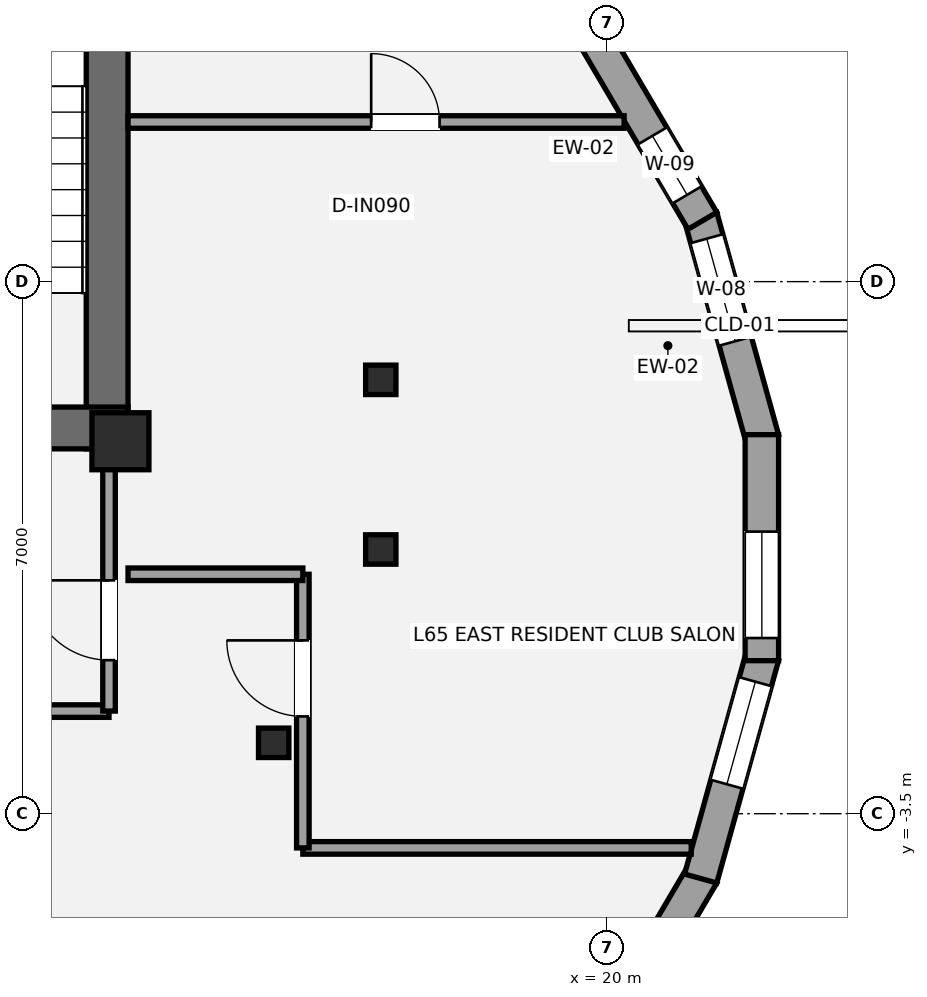
"""IFC4 building model, lengths in metres.
Left out: names, types, materials, properties, quantities, classifications, styles, units other than length and angle.
Written with IfcOpenShell. Run it as: python <this file> out.ifc"""

import sys

from ifc_helpers import new_model, si_unit, direction, frame, frame_2d, origin, origin_2d, place, context, subcontext, project, spatial, rectangle, i_section, extrude, element, fill, save


model = new_model("IFC4")
c1 = context("Model", 3, precision=1e-05, world=origin(), true_north=direction((0.0, 1.0)))
c2 = subcontext(c1, "Body", "Model", "MODEL_VIEW")
j1 = project(units=[si_unit("LENGTHUNIT", "METRE"), si_unit("PLANEANGLEUNIT", "RADIAN")], contexts=[c1])
p1 = place(None, origin())
s1 = spatial("IfcSite", under=j1, at=p1, CompositionType="ELEMENT")
p2 = place(p1, origin())
s2 = spatial("IfcBuilding", under=s1, at=p2, CompositionType="ELEMENT")
p3 = place(p2, frame((0.0, 0.0, 232.05)))
s3 = spatial("IfcBuildingStorey", under=s2, at=p3, CompositionType="ELEMENT", Elevation=232.05)
p4 = place(p3, frame((13.425, 1.3, 0.0), z_axis=(0.0, 0.0, 1.0), x_axis=(0.0, 1.0, 0.0)))
e1 = element("IfcWall", 1, at=p4, inside=s3, PredefinedType="SHEAR", context=c2, shape_type="SweptSolid", body=[
    extrude(rectangle(XDim=8.25, YDim=0.55, at=frame_2d((4.125, 0.0))), origin(), (0.0, 0.0, 1.0), 3.15),
])
p5 = place(p3, frame((13.7, 1.575, 0.0), z_axis=(0.0, 0.0, 1.0), x_axis=(-1.0, 0.0, 0.0)))
e2 = element("IfcWall", 2, at=p5, inside=s3, PredefinedType="SHEAR", context=c2, shape_type="SweptSolid", body=[
    extrude(rectangle(XDim=8.775, YDim=0.55, at=frame_2d((4.387, 0.0))), origin(), (0.0, 0.0, 1.0), 3.15),
])
p6 = place(p5, frame((2.35, 0.0, 0.0)))
e3 = element("IfcOpeningElement", 3, at=p6, cuts=e2, PredefinedType="OPENING", context=c2, shape_type="SweptSolid", body=[
    extrude(rectangle(XDim=1.05, YDim=2.15, at=frame_2d((0.525, 1.075))), frame((0.0, 0.285, 0.0), z_axis=(0.0, -1.0, 0.0), x_axis=(1.0, 0.0, 0.0)), (0.0, 0.0, 1.0), 0.57),
])
p7 = place(p5, frame((4.35, 0.0, 0.0)))
e4 = element("IfcOpeningElement", 4, at=p7, cuts=e2, PredefinedType="OPENING", context=c2, shape_type="SweptSolid", body=[
    extrude(rectangle(XDim=1.1, YDim=2.2, at=frame_2d((0.55, 1.1))), frame((0.0, 0.285, 0.0), z_axis=(0.0, -1.0, 0.0), x_axis=(1.0, 0.0, 0.0)), (0.0, 0.0, 1.0), 0.57),
])
p8 = place(p3, frame((13.6, 1.4, 0.0), z_axis=(0.0, 0.0, 1.0), x_axis=(1.0, 0.0, 0.0)))
e5 = element("IfcColumn", 5, at=p8, inside=s3, PredefinedType="PILASTER", context=c2, shape_type="SweptSolid", body=[
    extrude(rectangle(XDim=0.75, YDim=0.75, at=origin_2d()), origin(), (0.0, 0.0, 1.0), 3.15),
])
for number, where, z_axis, x_axis in (
    (6, (17.026, 2.208, 0.0), (0.0, 0.0, 1.0), (1.0, 0.0, 0.0)),
    (7, (15.616, -2.567, 0.0), (0.0, 0.0, 1.0), (1.0, 0.0, 0.0)),
    (8, (17.026, -0.024, 0.0), (0.0, 0.0, 1.0), (1.0, 0.0, 0.0)),
):
    element("IfcColumn", number, at=place(p3, frame(where, z_axis=z_axis, x_axis=x_axis)), inside=s3, PredefinedType="COLUMN", context=c2, shape_type="SweptSolid", body=[
        extrude(i_section(OverallWidth=0.399, OverallDepth=0.387, WebThickness=0.021, FlangeThickness=0.033, at=origin_2d()), origin(), (0.0, 0.0, 1.0), 3.15),
    ])
p9 = place(p3, frame((21.235, 4.353, 0.0), z_axis=(0.0, 0.0, 1.0), x_axis=(0.267714373586, -0.963498320795, 0.0)))
e9 = element("IfcWall", 9, at=p9, inside=s3, PredefinedType="STANDARD", context=c2, shape_type="SweptSolid", body=[
    extrude(rectangle(XDim=3.036, YDim=0.44, at=frame_2d((1.518, 0.0))), origin(), (0.0, 0.0, 1.0), 2.336),
])
p10 = place(p9, frame((0.299, 0.0, 0.55)))
e10 = element("IfcOpeningElement", 10, at=p10, cuts=e9, PredefinedType="OPENING", context=c2, shape_type="SweptSolid", body=[
    extrude(rectangle(XDim=1.4, YDim=1.55, at=frame_2d((0.7, 0.775))), frame((0.0, 0.23, 0.0), z_axis=(0.0, -1.0, 0.0), x_axis=(1.0, 0.0, 0.0)), (0.0, 0.0, 1.0), 0.46),
])
p11 = place(p3, frame((19.626, 7.071, 0.0), z_axis=(0.0, 0.0, 1.0), x_axis=(0.507308799926, -0.861764342218, 0.0)))
e11 = element("IfcWall", 11, at=p11, inside=s3, PredefinedType="STANDARD", context=c2, shape_type="SweptSolid", body=[
    extrude(rectangle(XDim=3.215, YDim=0.44, at=frame_2d((1.607, 0.0))), origin(), (0.0, 0.0, 1.0), 2.336),
])
p12 = place(p11, frame((1.919, 0.0, 0.58)))
e12 = element("IfcOpeningElement", 12, at=p12, cuts=e11, PredefinedType="OPENING", context=c2, shape_type="SweptSolid", body=[
    extrude(rectangle(XDim=0.9, YDim=1.35, at=frame_2d((0.45, 0.675))), frame((0.0, 0.23, 0.0), z_axis=(0.0, -1.0, 0.0), x_axis=(1.0, 0.0, 0.0)), (0.0, 0.0, 1.0), 0.46),
])
p13 = place(p3, frame((21.257, -4.3, 0.0), z_axis=(0.0, 0.0, 1.0), x_axis=(-0.507308799926, -0.861764342218, 0.0)))
e13 = element("IfcWall", 13, at=p13, inside=s3, PredefinedType="STANDARD", context=c2, shape_type="SweptSolid", body=[
    extrude(rectangle(XDim=3.215, YDim=0.44, at=frame_2d((1.607, 0.0))), origin(), (0.0, 0.0, 1.0), 2.336),
])
p14 = place(p13, frame((1.33, 0.0, 0.58)))
e14 = element("IfcOpeningElement", 14, at=p14, cuts=e13, PredefinedType="OPENING", context=c2, shape_type="SweptSolid", body=[
    extrude(rectangle(XDim=0.9, YDim=1.35, at=frame_2d((0.45, 0.675))), frame((0.0, 0.23, 0.0), z_axis=(0.0, -1.0, 0.0), x_axis=(1.0, 0.0, 0.0)), (0.0, 0.0, 1.0), 0.46),
])
p15 = place(p3, frame((22.047, -1.428, 0.0), z_axis=(0.0, 0.0, 1.0), x_axis=(-0.267714373586, -0.963498320795, 0.0)))
e15 = element("IfcWall", 15, at=p15, inside=s3, PredefinedType="STANDARD", context=c2, shape_type="SweptSolid", body=[
    extrude(rectangle(XDim=3.036, YDim=0.44, at=frame_2d((1.518, 0.0))), origin(), (0.0, 0.0, 1.0), 2.336),
])
p16 = place(p15, frame((0.348, 0.0, 0.55)))
e16 = element("IfcOpeningElement", 16, at=p16, cuts=e15, PredefinedType="OPENING", context=c2, shape_type="SweptSolid", body=[
    extrude(rectangle(XDim=1.4, YDim=1.55, at=frame_2d((0.7, 0.775))), frame((0.0, 0.23, 0.0), z_axis=(0.0, -1.0, 0.0), x_axis=(1.0, 0.0, 0.0)), (0.0, 0.0, 1.0), 0.46),
])
p17 = place(p3, frame((22.039, 1.487, 0.0), z_axis=(0.0, 0.0, 1.0), x_axis=(0.0, -1.0, 0.0)))
e17 = element("IfcWall", 17, at=p17, inside=s3, PredefinedType="STANDARD", context=c2, shape_type="SweptSolid", body=[
    extrude(rectangle(XDim=2.974, YDim=0.44, at=frame_2d((1.487, 0.0))), origin(), (0.0, 0.0, 1.0), 2.336),
])
p18 = place(p17, frame((1.276, 0.0, 0.58)))
e18 = element("IfcOpeningElement", 18, at=p18, cuts=e17, PredefinedType="OPENING", context=c2, shape_type="SweptSolid", body=[
    extrude(rectangle(XDim=1.4, YDim=1.55, at=frame_2d((0.7, 0.775))), frame((0.0, 0.23, 0.0), z_axis=(0.0, -1.0, 0.0), x_axis=(1.0, 0.0, 0.0)), (0.0, 0.0, 1.0), 0.46),
])
p19 = place(p3, frame((7.2, -2.15, 0.0), z_axis=(0.0, 0.0, 1.0), x_axis=(1.0, 0.0, 0.0)))
e19 = element("IfcWall", 19, at=p19, inside=s3, PredefinedType="PARTITIONING", context=c2, shape_type="SweptSolid", body=[
    extrude(rectangle(XDim=6.25, YDim=0.165, at=frame_2d((3.125, 0.0))), origin(), (0.0, 0.0, 1.0), 2.97),
])
p20 = place(p3, frame((13.45, -2.15, 0.0), z_axis=(0.0, 0.0, 1.0), x_axis=(0.0, 1.0, 0.0)))
e20 = element("IfcWall", 20, at=p20, inside=s3, PredefinedType="PARTITIONING", context=c2, shape_type="SweptSolid", body=[
    extrude(rectangle(XDim=3.5, YDim=0.165, at=frame_2d((1.75, 0.0))), origin(), (0.0, 0.0, 1.0), 2.423),
])
p21 = place(p20, frame((0.67, 0.0, 0.0)))
e21 = element("IfcOpeningElement", 21, at=p21, cuts=e20, PredefinedType="OPENING", context=c2, shape_type="SweptSolid", body=[
    extrude(rectangle(XDim=1.05, YDim=2.15, at=frame_2d((0.525, 1.075))), frame((0.0, 0.093, 0.0), z_axis=(0.0, -1.0, 0.0), x_axis=(1.0, 0.0, 0.0)), (0.0, 0.0, 1.0), 0.185),
])
p22 = place(p3, frame((16.0, -3.95, 0.0), z_axis=(0.0, 0.0, 1.0), x_axis=(1.0, 0.0, 0.0)))
e22 = element("IfcWall", 22, at=p22, inside=s3, PredefinedType="PARTITIONING", context=c2, shape_type="SweptSolid", body=[
    extrude(rectangle(XDim=5.11, YDim=0.165, at=frame_2d((2.555, 0.0))), origin(), (0.0, 0.0, 1.0), 2.423),
])
p23 = place(p3, frame((16.0, -3.95, 0.0), z_axis=(0.0, 0.0, 1.0), x_axis=(0.0, 1.0, 0.0)))
e23 = element("IfcWall", 23, at=p23, inside=s3, PredefinedType="PARTITIONING", context=c2, shape_type="SweptSolid", body=[
    extrude(rectangle(XDim=3.6, YDim=0.165, at=frame_2d((1.8, 0.0))), origin(), (0.0, 0.0, 1.0), 2.357),
])
p24 = place(p23, frame((1.73, 0.0, 0.0)))
e24 = element("IfcOpeningElement", 24, at=p24, cuts=e23, PredefinedType="OPENING", context=c2, shape_type="SweptSolid", body=[
    extrude(rectangle(XDim=1.0, YDim=2.15, at=frame_2d((0.5, 1.075))), frame((0.0, 0.093, 0.0), z_axis=(0.0, -1.0, 0.0), x_axis=(1.0, 0.0, 0.0)), (0.0, 0.0, 1.0), 0.185),
])
p25 = place(p3, frame((13.7, -0.35, 0.0), z_axis=(0.0, 0.0, 1.0), x_axis=(1.0, 0.0, 0.0)))
e25 = element("IfcWall", 25, at=p25, inside=s3, PredefinedType="PARTITIONING", context=c2, shape_type="SweptSolid", body=[
    extrude(rectangle(XDim=2.3, YDim=0.165, at=frame_2d((1.15, 0.0))), origin(), (0.0, 0.0, 1.0), 2.423),
])
p26 = place(p3, frame((13.7, 5.6, 0.0), z_axis=(0.0, 0.0, 1.0), x_axis=(1.0, 0.0, 0.0)))
e26 = element("IfcWall", 26, at=p26, inside=s3, PredefinedType="PARTITIONING", context=c2, shape_type="SweptSolid", body=[
    extrude(rectangle(XDim=6.527, YDim=0.165, at=frame_2d((3.264, 0.0))), origin(), (0.0, 0.0, 1.0), 2.423),
])
p27 = place(p26, frame((3.199, 0.0, 0.0)))
e27 = element("IfcOpeningElement", 27, at=p27, cuts=e26, PredefinedType="OPENING", context=c2, shape_type="SweptSolid", body=[
    extrude(rectangle(XDim=0.9, YDim=2.1, at=frame_2d((0.45, 1.05))), frame((0.0, 0.093, 0.0), z_axis=(0.0, -1.0, 0.0), x_axis=(1.0, 0.0, 0.0)), (0.0, 0.0, 1.0), 0.185),
])
p28 = place(p10, origin())
e28 = element("IfcWindow", 28, at=p28, inside=s3, PartitioningType="SINGLE_PANEL", PredefinedType="WINDOW", context=c2, shape_type="SweptSolid", body=[
    extrude(rectangle(XDim=1.4, YDim=1.55, at=frame_2d((0.7, 0.775))), frame((0.0, -0.01, 0.0), z_axis=(0.0, -1.0, 0.0), x_axis=(1.0, 0.0, 0.0)), (0.0, 0.0, 1.0), 0.06),
])
fill(e10, e28)
p29 = place(p12, origin())
e29 = element("IfcWindow", 29, at=p29, inside=s3, PartitioningType="SINGLE_PANEL", PredefinedType="WINDOW", context=c2, shape_type="SweptSolid", body=[
    extrude(rectangle(XDim=0.9, YDim=1.35, at=frame_2d((0.45, 0.675))), frame((0.0, -0.01, 0.0), z_axis=(0.0, -1.0, 0.0), x_axis=(1.0, 0.0, 0.0)), (0.0, 0.0, 1.0), 0.06),
])
fill(e12, e29)
p30 = place(p16, origin())
e30 = element("IfcWindow", 30, at=p30, inside=s3, PartitioningType="SINGLE_PANEL", PredefinedType="WINDOW", context=c2, shape_type="SweptSolid", body=[
    extrude(rectangle(XDim=1.4, YDim=1.55, at=frame_2d((0.7, 0.775))), frame((0.0, -0.01, 0.0), z_axis=(0.0, -1.0, 0.0), x_axis=(1.0, 0.0, 0.0)), (0.0, 0.0, 1.0), 0.06),
])
fill(e16, e30)
p31 = place(p18, origin())
e31 = element("IfcWindow", 31, at=p31, inside=s3, PartitioningType="SINGLE_PANEL", PredefinedType="WINDOW", context=c2, shape_type="SweptSolid", body=[
    extrude(rectangle(XDim=1.4, YDim=1.55, at=frame_2d((0.7, 0.775))), frame((0.0, -0.01, 0.0), z_axis=(0.0, -1.0, 0.0), x_axis=(1.0, 0.0, 0.0)), (0.0, 0.0, 1.0), 0.06),
])
fill(e18, e31)
p32 = place(p21, origin())
e32 = element("IfcDoor", 32, at=p32, inside=s3, OperationType="SINGLE_SWING_RIGHT", PredefinedType="DOOR", context=c2, shape_type="SweptSolid", body=[
    extrude(rectangle(XDim=1.05, YDim=2.15, at=frame_2d((0.525, 1.075))), frame((0.0, 0.025, 0.0), z_axis=(0.0, -1.0, 0.0), x_axis=(1.0, 0.0, 0.0)), (0.0, 0.0, 1.0), 0.05),
])
fill(e21, e32)
p33 = place(p24, origin())
e33 = element("IfcDoor", 33, at=p33, inside=s3, OperationType="SINGLE_SWING_RIGHT", PredefinedType="DOOR", context=c2, shape_type="SweptSolid", body=[
    extrude(rectangle(XDim=1.0, YDim=2.15, at=frame_2d((0.5, 1.075))), frame((0.0, 0.025, 0.0), z_axis=(0.0, -1.0, 0.0), x_axis=(1.0, 0.0, 0.0)), (0.0, 0.0, 1.0), 0.05),
])
fill(e24, e33)
p34 = place(p27, origin())
e34 = element("IfcDoor", 34, at=p34, inside=s3, OperationType="SINGLE_SWING_LEFT", PredefinedType="DOOR", context=c2, shape_type="SweptSolid", body=[
    extrude(rectangle(XDim=0.9, YDim=2.1, at=frame_2d((0.45, 1.05))), frame((0.0, 0.025, 0.0), z_axis=(0.0, -1.0, 0.0), x_axis=(1.0, 0.0, 0.0)), (0.0, 0.0, 1.0), 0.05),
])
fill(e27, e34)
save(model, sys.argv[1])
